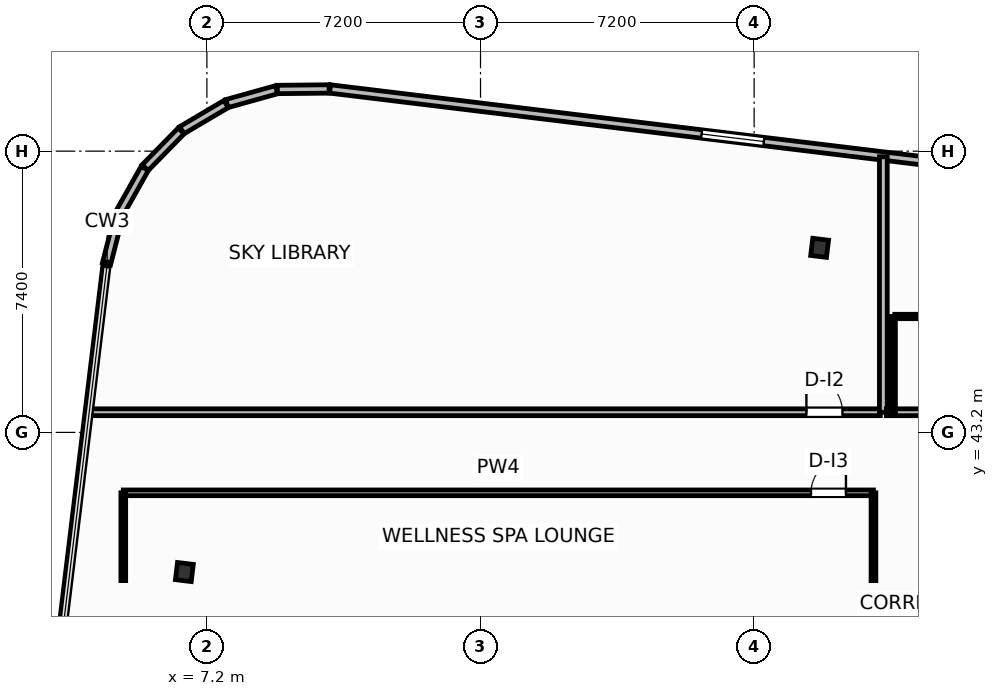
"""IFC4 building model, lengths in metres.
Left out: names, types, materials, properties, quantities, classifications, styles, units other than length and angle.
Written with IfcOpenShell. Run it as: python <this file> out.ifc"""

import sys

from ifc_helpers import new_model, si_unit, direction, frame, frame_2d, origin, origin_2d, place, context, subcontext, project, spatial, rectangle, i_section, extrude, element, fill, save


model = new_model("IFC4")
c1 = context("Model", 3, precision=1e-05, world=origin(), true_north=direction((0.0, 1.0)))
c2 = subcontext(c1, "Body", "Model", "MODEL_VIEW")
j1 = project(units=[si_unit("LENGTHUNIT", "METRE"), si_unit("PLANEANGLEUNIT", "RADIAN")], contexts=[c1])
p1 = place(None, origin())
s1 = spatial("IfcSite", under=j1, at=p1, CompositionType="ELEMENT")
p2 = place(p1, origin())
s2 = spatial("IfcBuilding", under=s1, at=p2, CompositionType="ELEMENT")
p3 = place(p2, frame((0.0, 0.0, 143.9)))
s3 = spatial("IfcBuildingStorey", under=s2, at=p3, CompositionType="ELEMENT", Elevation=143.9)
for number, where, z_axis, x_axis in (
    (1, (23.323, 48.056, 0.0), (0.0, 0.0, 1.0), (0.993, -0.12, 0.0)),
    (2, (6.607, 39.526, 0.0), (0.0, 0.0, 1.0), (0.993, -0.12, 0.0)),
):
    element("IfcColumn", number, at=place(p3, frame(where, z_axis=z_axis, x_axis=x_axis)), inside=s3, PredefinedType="COLUMN", context=c2, shape_type="SweptSolid", body=[
        extrude(i_section(OverallWidth=0.418, OverallDepth=0.455, WebThickness=0.042, FlangeThickness=0.068, FilletRadius=0.025, at=origin_2d()), origin(), (0.0, 0.0, 1.0), 3.7),
    ])
p4 = place(p3, frame((31.633, 49.668, 0.0), z_axis=(0.0, 0.0, 1.0), x_axis=(-0.992731670483, 0.120348786531, 0.0)))
e3 = element("IfcWall", 3, at=p4, inside=s3, PredefinedType="SOLIDWALL", context=c2, shape_type="SweptSolid", body=[
    extrude(rectangle(XDim=21.347, YDim=0.22, at=frame_2d((10.674, 0.0))), origin(), (0.0, 0.0, 1.0), 2.73),
])
p5 = place(p4, frame((9.849, 0.0, 0.8)))
e4 = element("IfcOpeningElement", 4, at=p5, cuts=e3, PredefinedType="OPENING", context=c2, shape_type="SweptSolid", body=[
    extrude(rectangle(XDim=1.65, YDim=1.65, at=frame_2d((0.825, 0.825))), frame((0.0, 0.12, 0.0), z_axis=(0.0, -1.0, 0.0), x_axis=(1.0, 0.0, 0.0)), (0.0, 0.0, 1.0), 0.24),
])
p6 = place(p3, frame((10.416, 52.237, 0.0), z_axis=(0.0, 0.0, 1.0), x_axis=(-0.999947718056, -0.010225514878, 0.0)))
e5 = element("IfcWall", 5, at=p6, inside=s3, PredefinedType="SOLIDWALL", context=c2, shape_type="SweptSolid", body=[
    extrude(rectangle(XDim=1.361, YDim=0.22, at=frame_2d((0.68, 0.0))), origin(), (0.0, 0.0, 1.0), 2.73),
])
for number, where, z_axis, x_axis in (
    (6, (9.031, 52.216, 0.0), (0.0, 0.0, 1.0), (-0.963, -0.269, 0.0)),
    (7, (7.706, 51.84, 0.0), (0.0, 0.0, 1.0), (-0.861, -0.509, 0.0)),
):
    element("IfcWall", number, at=place(p3, frame(where, z_axis=z_axis, x_axis=x_axis)), inside=s3, PredefinedType="SOLIDWALL", context=c2, shape_type="SweptSolid", body=[
        extrude(rectangle(XDim=1.353, YDim=0.22, at=frame_2d((0.677, 0.0))), origin(), (0.0, 0.0, 1.0), 2.73),
    ])
p7 = place(p3, frame((6.523, 51.133, 0.0), z_axis=(0.0, 0.0, 1.0), x_axis=(-0.699762925925, -0.714375144795, 0.0)))
e8 = element("IfcWall", 8, at=p7, inside=s3, PredefinedType="SOLIDWALL", context=c2, shape_type="SweptSolid", body=[
    extrude(rectangle(XDim=1.353, YDim=0.22, at=frame_2d((0.677, 0.0))), origin(), (0.0, 0.0, 1.0), 2.73),
])
p8 = place(p3, frame((5.564, 50.145, 0.0), z_axis=(0.0, 0.0, 1.0), x_axis=(-0.491117621399, -0.871093268227, 0.0)))
e9 = element("IfcWall", 9, at=p8, inside=s3, PredefinedType="SOLIDWALL", context=c2, shape_type="SweptSolid", body=[
    extrude(rectangle(XDim=1.353, YDim=0.22, at=frame_2d((0.677, 0.0))), origin(), (0.0, 0.0, 1.0), 2.73),
])
p9 = place(p3, frame((4.894, 48.942, 0.0), z_axis=(0.0, 0.0, 1.0), x_axis=(-0.248857256909, -0.968540172468, 0.0)))
e10 = element("IfcWall", 10, at=p9, inside=s3, PredefinedType="SOLIDWALL", context=c2, shape_type="SweptSolid", body=[
    extrude(rectangle(XDim=1.353, YDim=0.22, at=frame_2d((0.676, 0.0))), origin(), (0.0, 0.0, 1.0), 2.73),
])
p10 = place(p3, frame((5.0, 41.61, 0.0), z_axis=(0.0, 0.0, 1.0), x_axis=(1.0, 0.0, 0.0)))
e11 = element("IfcWall", 11, at=p10, inside=s3, PredefinedType="PARTITIONING", context=c2, shape_type="SweptSolid", body=[
    extrude(rectangle(XDim=19.74, YDim=0.15, at=frame_2d((9.87, 0.0))), origin(), (0.0, 0.0, 1.0), 3.45),
])
p11 = place(p10, frame((18.096, 0.0, 0.0)))
e12 = element("IfcOpeningElement", 12, at=p11, cuts=e11, PredefinedType="OPENING", context=c2, shape_type="SweptSolid", body=[
    extrude(rectangle(XDim=0.92, YDim=2.05, at=frame_2d((0.46, 1.025))), frame((0.0, 0.085, 0.0), z_axis=(0.0, -1.0, 0.0), x_axis=(1.0, 0.0, 0.0)), (0.0, 0.0, 1.0), 0.17),
])
for number, where, z_axis, x_axis in (
    (13, (5.0, 39.3, 0.0), (0.0, 0.0, 1.0), (0.0, 1.0, 0.0)),
    (14, (24.74, 39.3, 0.0), (0.0, 0.0, 1.0), (0.0, 1.0, 0.0)),
):
    element("IfcWall", number, at=place(p3, frame(where, z_axis=z_axis, x_axis=x_axis)), inside=s3, PredefinedType="PARTITIONING", context=c2, shape_type="SweptSolid", body=[
        extrude(rectangle(XDim=2.31, YDim=0.125, at=frame_2d((1.155, 0.0))), origin(), (0.0, 0.0, 1.0), 3.45),
    ])
p12 = place(p3, frame((4.143, 43.73, 0.0), z_axis=(0.0, 0.0, 1.0), x_axis=(1.0, 0.0, 0.0)))
e15 = element("IfcWall", 15, at=p12, inside=s3, PredefinedType="PARTITIONING", context=c2, shape_type="SweptSolid", body=[
    extrude(rectangle(XDim=20.777, YDim=0.18, at=frame_2d((10.389, 0.0))), origin(), (0.0, 0.0, 1.0), 3.45),
])
p13 = place(p12, frame((18.832, 0.0, 0.0)))
e16 = element("IfcOpeningElement", 16, at=p13, cuts=e15, PredefinedType="OPENING", context=c2, shape_type="SweptSolid", body=[
    extrude(rectangle(XDim=0.95, YDim=2.05, at=frame_2d((0.475, 1.025))), frame((0.0, 0.1, 0.0), z_axis=(0.0, -1.0, 0.0), x_axis=(1.0, 0.0, 0.0)), (0.0, 0.0, 1.0), 0.2),
])
p14 = place(p3, frame((25.0, 43.73, 0.0), z_axis=(0.0, 0.0, 1.0), x_axis=(0.0, 1.0, 0.0)))
e17 = element("IfcWall", 17, at=p14, inside=s3, PredefinedType="PARTITIONING", context=c2, shape_type="SweptSolid", body=[
    extrude(rectangle(XDim=6.722, YDim=0.205, at=frame_2d((3.361, 0.0))), origin(), (0.0, 0.0, 1.0), 3.45),
])
p15 = place(p3, frame((25.08, 43.73, 0.0), z_axis=(0.0, 0.0, 1.0), x_axis=(1.0, 0.0, 0.0)))
e18 = element("IfcWall", 18, at=p15, inside=s3, PredefinedType="PARTITIONING", context=c2, shape_type="SweptSolid", body=[
    extrude(rectangle(XDim=14.04, YDim=0.18, at=frame_2d((7.02, 0.0))), origin(), (0.0, 0.0, 1.0), 2.972),
])
p16 = place(p15, frame((3.23, 0.0, 0.0)))
e19 = element("IfcOpeningElement", 19, at=p16, cuts=e18, PredefinedType="OPENING", context=c2, shape_type="SweptSolid", body=[
    extrude(rectangle(XDim=0.95, YDim=2.15, at=frame_2d((0.475, 1.075))), frame((0.0, 0.1, 0.0), z_axis=(0.0, -1.0, 0.0), x_axis=(1.0, 0.0, 0.0)), (0.0, 0.0, 1.0), 0.2),
])
p17 = place(p3, frame((25.3, 46.25, 0.0), z_axis=(0.0, 0.0, 1.0), x_axis=(1.0, 0.0, 0.0)))
e20 = element("IfcWall", 20, at=p17, inside=s3, PredefinedType="PARTITIONING", context=c2, shape_type="SweptSolid", body=[
    extrude(rectangle(XDim=2.15, YDim=0.115, at=frame_2d((1.075, 0.0))), origin(), (0.0, 0.0, 1.0), 3.45),
])
p18 = place(p3, frame((25.26, 43.73, 0.0), z_axis=(0.0, 0.0, 1.0), x_axis=(0.0, 1.0, 0.0)))
e21 = element("IfcWall", 21, at=p18, inside=s3, PredefinedType="PARTITIONING", context=c2, shape_type="SweptSolid", body=[
    extrude(rectangle(XDim=2.52, YDim=0.115, at=frame_2d((1.26, 0.0))), origin(), (0.0, 0.0, 1.0), 3.45),
])
p19 = place(p5, origin())
e22 = element("IfcWindow", 22, at=p19, inside=s3, PartitioningType="SINGLE_PANEL", PredefinedType="WINDOW", context=c2, shape_type="SweptSolid", body=[
    extrude(rectangle(XDim=1.65, YDim=1.65, at=frame_2d((0.825, 0.825))), frame((0.0, 0.03, 0.0), z_axis=(0.0, -1.0, 0.0), x_axis=(1.0, 0.0, 0.0)), (0.0, 0.0, 1.0), 0.06),
])
fill(e4, e22)
p20 = place(p11, origin())
e23 = element("IfcDoor", 23, at=p20, inside=s3, OperationType="SINGLE_SWING_RIGHT", PredefinedType="DOOR", context=c2, shape_type="SweptSolid", body=[
    extrude(rectangle(XDim=0.92, YDim=2.05, at=frame_2d((0.46, 1.025))), frame((0.0, 0.025, 0.0), z_axis=(0.0, -1.0, 0.0), x_axis=(1.0, 0.0, 0.0)), (0.0, 0.0, 1.0), 0.05),
])
fill(e12, e23)
p21 = place(p13, origin())
e24 = element("IfcDoor", 24, at=p21, inside=s3, OperationType="SINGLE_SWING_LEFT", PredefinedType="DOOR", context=c2, shape_type="SweptSolid", body=[
    extrude(rectangle(XDim=0.95, YDim=2.05, at=frame_2d((0.475, 1.025))), frame((0.0, 0.025, 0.0), z_axis=(0.0, -1.0, 0.0), x_axis=(1.0, 0.0, 0.0)), (0.0, 0.0, 1.0), 0.05),
])
fill(e16, e24)
save(model, sys.argv[1])
